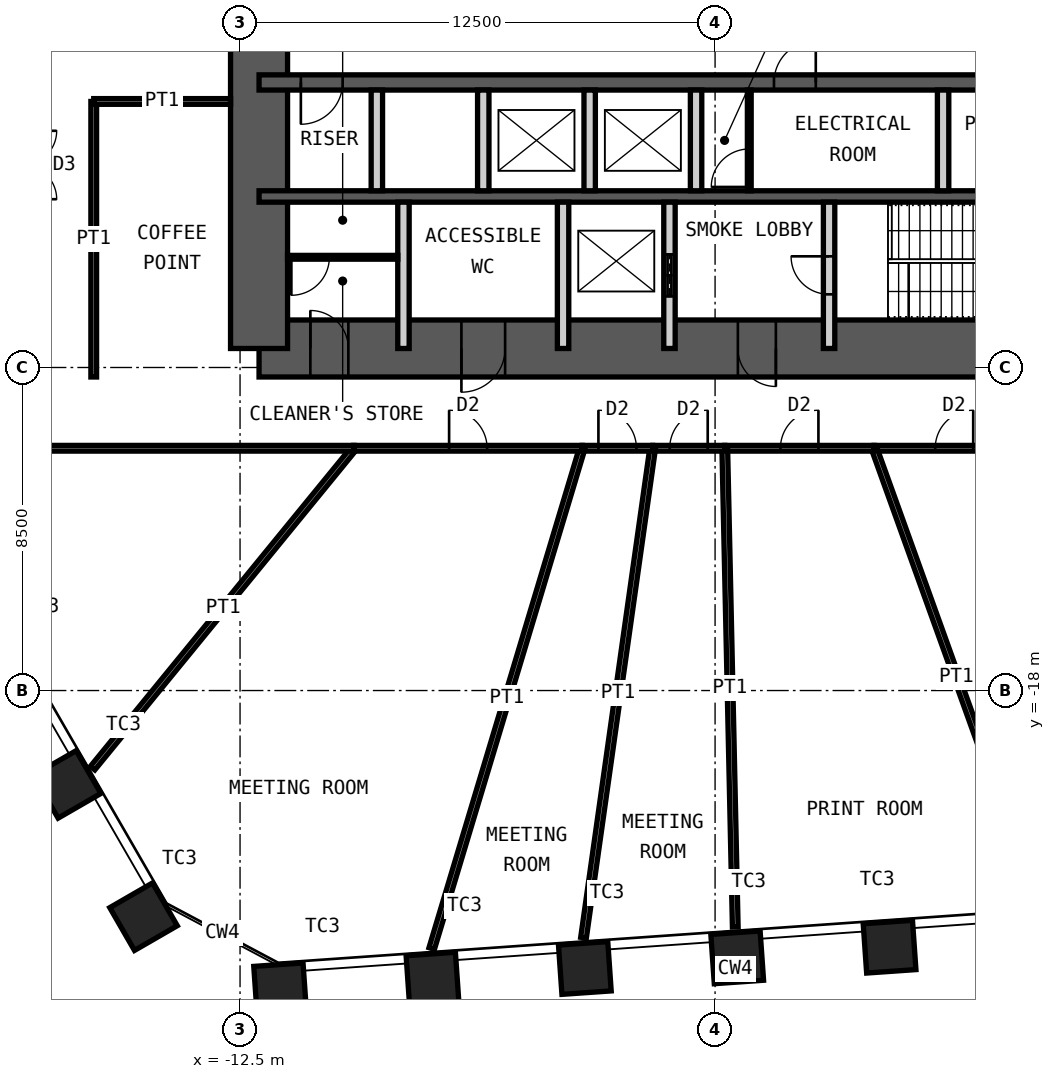
"""IFC4 building model, lengths in metres.
Left out: names, types, materials, properties, quantities, classifications, styles, units other than length and angle.
Written with IfcOpenShell. Run it as: python <this file> out.ifc"""

import sys

from ifc_helpers import new_model, si_unit, direction, frame, frame_2d, origin, origin_2d, place, context, subcontext, project, spatial, rectangle, hollow_rectangle, extrude, element, fill, save


model = new_model("IFC4")
c1 = context("Model", 3, precision=1e-05, world=origin(), true_north=direction((0.0, 1.0)))
c2 = subcontext(c1, "Body", "Model", "MODEL_VIEW")
j1 = project(units=[si_unit("LENGTHUNIT", "METRE"), si_unit("PLANEANGLEUNIT", "RADIAN")], contexts=[c1])
p1 = place(None, origin())
s1 = spatial("IfcSite", under=j1, at=p1, CompositionType="ELEMENT")
p2 = place(p1, origin())
s2 = spatial("IfcBuilding", under=s1, at=p2, CompositionType="ELEMENT")
p3 = place(p2, frame((0.0, 0.0, 107.2)))
s3 = spatial("IfcBuildingStorey", under=s2, at=p3, CompositionType="ELEMENT", Elevation=107.2)
for number, where, z_axis, x_axis in (
    (1, (4.592, -24.74, 0.0), (0.0, 0.0, 1.0), (0.998, 0.07, 0.0)),
    (2, (0.582, -25.02, 0.0), (0.0, 0.0, 1.0), (0.998, 0.07, 0.0)),
    (3, (-3.427, -25.301, 0.0), (0.0, 0.0, 1.0), (0.998, 0.07, 0.0)),
    (4, (-7.436, -25.581, 0.0), (0.0, 0.0, 1.0), (0.998, 0.07, 0.0)),
    (5, (-11.446, -25.861, 0.0), (0.0, 0.0, 1.0), (0.998, 0.07, 0.0)),
    (6, (-15.04, -23.95, 0.0), (0.0, 0.0, 1.0), (0.5, -0.866, 0.0)),
    (7, (-17.049, -20.47, 0.0), (0.0, 0.0, 1.0), (0.5, -0.866, 0.0)),
):
    element("IfcColumn", number, at=place(p3, frame(where, z_axis=z_axis, x_axis=x_axis)), inside=s3, PredefinedType="COLUMN", context=c2, shape_type="SweptSolid", body=[
        extrude(hollow_rectangle(XDim=1.3, YDim=1.3, WallThickness=0.1, at=origin_2d()), origin(), (0.0, 0.0, 1.0), 4.2),
    ])
p4 = place(p3, frame((-12.0, -9.0, 0.0), z_axis=(0.0, 0.0, 1.0), x_axis=(1.0, 0.0, 0.0)))
e8 = element("IfcWall", 8, at=p4, inside=s3, PredefinedType="SHEAR", context=c2, shape_type="SweptSolid", body=[
    extrude(rectangle(XDim=24.0, YDim=1.5, at=frame_2d((12.0, 0.0))), origin(), (0.0, 0.0, 1.0), 4.2),
])
p5 = place(p4, frame((1.35, 0.0, 0.0)))
e9 = element("IfcOpeningElement", 9, at=p5, cuts=e8, PredefinedType="OPENING", context=c2, shape_type="SweptSolid", body=[
    extrude(rectangle(XDim=1.0, YDim=2.1, at=frame_2d((0.5, 1.05))), frame((0.0, 0.76, 0.0), z_axis=(0.0, -1.0, 0.0), x_axis=(1.0, 0.0, 0.0)), (0.0, 0.0, 1.0), 1.52),
])
p6 = place(p4, frame((5.325, 0.0, 0.0)))
e10 = element("IfcOpeningElement", 10, at=p6, cuts=e8, PredefinedType="OPENING", context=c2, shape_type="SweptSolid", body=[
    extrude(rectangle(XDim=1.15, YDim=2.1, at=frame_2d((0.575, 1.05))), frame((0.0, 0.76, 0.0), z_axis=(0.0, -1.0, 0.0), x_axis=(1.0, 0.0, 0.0)), (0.0, 0.0, 1.0), 1.52),
])
p7 = place(p4, frame((12.6, 0.0, 0.0)))
e11 = element("IfcOpeningElement", 11, at=p7, cuts=e8, PredefinedType="OPENING", context=c2, shape_type="SweptSolid", body=[
    extrude(rectangle(XDim=1.0, YDim=2.1, at=frame_2d((0.5, 1.05))), frame((0.0, 0.76, 0.0), z_axis=(0.0, -1.0, 0.0), x_axis=(1.0, 0.0, 0.0)), (0.0, 0.0, 1.0), 1.52),
])
p8 = place(p3, frame((-12.0, -9.0, 0.0), z_axis=(0.0, 0.0, 1.0), x_axis=(0.0, 1.0, 0.0)))
e12 = element("IfcWall", 12, at=p8, inside=s3, PredefinedType="SHEAR", context=c2, shape_type="SweptSolid", body=[
    extrude(rectangle(XDim=18.0, YDim=1.5, at=frame_2d((9.0, 0.0))), origin(), (0.0, 0.0, 1.0), 4.2),
])
p9 = place(p8, frame((8.1, 0.0, 0.0)))
e13 = element("IfcOpeningElement", 13, at=p9, cuts=e12, PredefinedType="OPENING", context=c2, shape_type="SweptSolid", body=[
    extrude(rectangle(XDim=1.8, YDim=2.1, at=frame_2d((0.9, 1.05))), frame((0.0, 0.76, 0.0), z_axis=(0.0, -1.0, 0.0), x_axis=(1.0, 0.0, 0.0)), (0.0, 0.0, 1.0), 1.52),
])
p10 = place(p3, frame((-12.0, -2.0, 0.0), z_axis=(0.0, 0.0, 1.0), x_axis=(1.0, 0.0, 0.0)))
e14 = element("IfcWall", 14, at=p10, inside=s3, PredefinedType="SHEAR", context=c2, shape_type="SweptSolid", body=[
    extrude(rectangle(XDim=24.0, YDim=0.4, at=frame_2d((12.0, 0.0))), origin(), (0.0, 0.0, 1.0), 4.2),
])
p11 = place(p10, frame((1.1, 0.0, 0.0)))
e15 = element("IfcOpeningElement", 15, at=p11, cuts=e14, PredefinedType="OPENING", context=c2, shape_type="SweptSolid", body=[
    extrude(rectangle(XDim=1.1, YDim=2.1, at=frame_2d((0.55, 1.05))), frame((0.0, 0.21, 0.0), z_axis=(0.0, -1.0, 0.0), x_axis=(1.0, 0.0, 0.0)), (0.0, 0.0, 1.0), 0.42),
])
p12 = place(p10, frame((13.55, 0.0, 0.0)))
e16 = element("IfcOpeningElement", 16, at=p12, cuts=e14, PredefinedType="OPENING", context=c2, shape_type="SweptSolid", body=[
    extrude(rectangle(XDim=1.1, YDim=2.1, at=frame_2d((0.55, 1.05))), frame((0.0, 0.21, 0.0), z_axis=(0.0, -1.0, 0.0), x_axis=(1.0, 0.0, 0.0)), (0.0, 0.0, 1.0), 0.42),
])
p13 = place(p10, frame((20.7, 0.0, 0.0)))
e17 = element("IfcOpeningElement", 17, at=p13, cuts=e14, PredefinedType="OPENING", context=c2, shape_type="SweptSolid", body=[
    extrude(rectangle(XDim=1.1, YDim=2.1, at=frame_2d((0.55, 1.05))), frame((0.0, 0.21, 0.0), z_axis=(0.0, -1.0, 0.0), x_axis=(1.0, 0.0, 0.0)), (0.0, 0.0, 1.0), 0.42),
])
p14 = place(p3, frame((-12.0, -5.0, 0.0), z_axis=(0.0, 0.0, 1.0), x_axis=(1.0, 0.0, 0.0)))
e18 = element("IfcWall", 18, at=p14, inside=s3, PredefinedType="SHEAR", context=c2, shape_type="SweptSolid", body=[
    extrude(rectangle(XDim=24.0, YDim=0.3, at=frame_2d((12.0, 0.0))), origin(), (0.0, 0.0, 1.0), 4.2),
])
for number, where, z_axis, x_axis in (
    (19, (-8.9, -4.85, 0.0), (0.0, 0.0, 1.0), (0.0, 1.0, 0.0)),
    (20, (-6.1, -4.85, 0.0), (0.0, 0.0, 1.0), (0.0, 1.0, 0.0)),
    (21, (-3.3, -4.85, 0.0), (0.0, 0.0, 1.0), (0.0, 1.0, 0.0)),
    (22, (-0.5, -4.85, 0.0), (0.0, 0.0, 1.0), (0.0, 1.0, 0.0)),
    (23, (6.0, -4.85, 0.0), (0.0, 0.0, 1.0), (0.0, 1.0, 0.0)),
):
    element("IfcWall", number, at=place(p3, frame(where, z_axis=z_axis, x_axis=x_axis)), inside=s3, PredefinedType="PARTITIONING", context=c2, shape_type="SweptSolid", body=[
        extrude(rectangle(XDim=2.65, YDim=0.3, at=frame_2d((1.325, 0.0))), origin(), (0.0, 0.0, 1.0), 3.98),
    ])
for number, where, z_axis, x_axis in (
    (24, (-8.2, -9.0, 0.0), (0.0, 0.0, 1.0), (0.0, 1.0, 0.0)),
    (25, (-4.0, -9.0, 0.0), (0.0, 0.0, 1.0), (0.0, 1.0, 0.0)),
):
    element("IfcWall", number, at=place(p3, frame(where, z_axis=z_axis, x_axis=x_axis)), inside=s3, PredefinedType="PARTITIONING", context=c2, shape_type="SweptSolid", body=[
        extrude(rectangle(XDim=3.85, YDim=0.3, at=frame_2d((1.925, 0.0))), origin(), (0.0, 0.0, 1.0), 3.98),
    ])
p15 = place(p3, frame((-1.2, -9.0, 0.0), z_axis=(0.0, 0.0, 1.0), x_axis=(0.0, 1.0, 0.0)))
e26 = element("IfcWall", 26, at=p15, inside=s3, PredefinedType="PARTITIONING", context=c2, shape_type="SweptSolid", body=[
    extrude(rectangle(XDim=3.85, YDim=0.3, at=frame_2d((1.925, 0.0))), origin(), (0.0, 0.0, 1.0), 3.98),
])
p16 = place(p15, frame((1.375, 0.0, 0.0)))
e27 = element("IfcOpeningElement", 27, at=p16, cuts=e26, PredefinedType="OPENING", context=c2, shape_type="SweptSolid", body=[
    extrude(rectangle(XDim=1.1, YDim=2.4, at=frame_2d((0.55, 1.2))), frame((0.0, 0.16, 0.0), z_axis=(0.0, -1.0, 0.0), x_axis=(1.0, 0.0, 0.0)), (0.0, 0.0, 1.0), 0.32),
])
p17 = place(p3, frame((3.0, -9.0, 0.0), z_axis=(0.0, 0.0, 1.0), x_axis=(0.0, 1.0, 0.0)))
e28 = element("IfcWall", 28, at=p17, inside=s3, PredefinedType="PARTITIONING", context=c2, shape_type="SweptSolid", body=[
    extrude(rectangle(XDim=3.85, YDim=0.3, at=frame_2d((1.925, 0.0))), origin(), (0.0, 0.0, 1.0), 3.98),
])
p18 = place(p17, frame((1.425, 0.0, 0.0)))
e29 = element("IfcOpeningElement", 29, at=p18, cuts=e28, PredefinedType="OPENING", context=c2, shape_type="SweptSolid", body=[
    extrude(rectangle(XDim=1.0, YDim=2.1, at=frame_2d((0.5, 1.05))), frame((0.0, 0.16, 0.0), z_axis=(0.0, -1.0, 0.0), x_axis=(1.0, 0.0, 0.0)), (0.0, 0.0, 1.0), 0.32),
])
p19 = place(p3, frame((0.9, -4.85, 0.0), z_axis=(0.0, 0.0, 1.0), x_axis=(0.0, 1.0, 0.0)))
e30 = element("IfcWall", 30, at=p19, inside=s3, PredefinedType="PARTITIONING", context=c2, shape_type="SweptSolid", body=[
    extrude(rectangle(XDim=2.65, YDim=0.1, at=frame_2d((1.325, 0.0))), origin(), (0.0, 0.0, 1.0), 3.98),
])
p20 = place(p19, frame((0.1, 0.0, 0.0)))
e31 = element("IfcOpeningElement", 31, at=p20, cuts=e30, PredefinedType="OPENING", context=c2, shape_type="SweptSolid", body=[
    extrude(rectangle(XDim=1.0, YDim=2.4, at=frame_2d((0.5, 1.2))), frame((0.0, 0.06, 0.0), z_axis=(0.0, -1.0, 0.0), x_axis=(1.0, 0.0, 0.0)), (0.0, 0.0, 1.0), 0.12),
])
p21 = place(p3, frame((-11.25, -6.6, 0.0), z_axis=(0.0, 0.0, 1.0), x_axis=(1.0, 0.0, 0.0)))
e32 = element("IfcWall", 32, at=p21, inside=s3, PredefinedType="PARTITIONING", context=c2, shape_type="SweptSolid", body=[
    extrude(rectangle(XDim=2.9, YDim=0.1, at=frame_2d((1.45, 0.0))), origin(), (0.0, 0.0, 1.0), 3.98),
])
p22 = place(p21, frame((0.1, 0.0, 0.0)))
e33 = element("IfcOpeningElement", 33, at=p22, cuts=e32, PredefinedType="OPENING", context=c2, shape_type="SweptSolid", body=[
    extrude(rectangle(XDim=1.0, YDim=2.4, at=frame_2d((0.5, 1.2))), frame((0.0, 0.06, 0.0), z_axis=(0.0, -1.0, 0.0), x_axis=(1.0, 0.0, 0.0)), (0.0, 0.0, 1.0), 0.12),
])
p23 = place(p3, frame((-16.38, -20.042, 0.0), z_axis=(0.0, 0.0, 1.0), x_axis=(0.632814540967, 0.774303400962, 0.0)))
e34 = element("IfcWall", 34, at=p23, inside=s3, PredefinedType="PARTITIONING", context=c2, shape_type="SweptSolid", body=[
    extrude(rectangle(XDim=10.871, YDim=0.15, at=frame_2d((5.435, 0.0))), origin(), (0.0, 0.0, 1.0), 3.33),
])
p24 = place(p3, frame((-9.501, -11.625, 0.0), z_axis=(0.0, 0.0, 1.0), x_axis=(-1.0, 0.0, 0.0)))
e35 = element("IfcWall", 35, at=p24, inside=s3, PredefinedType="PARTITIONING", context=c2, shape_type="SweptSolid", body=[
    extrude(rectangle(XDim=8.724, YDim=0.15, at=frame_2d((4.362, 0.0))), origin(), (0.0, 0.0, 1.0), 4.03),
])
p25 = place(p3, frame((8.401, -11.625, 0.0), z_axis=(0.0, 0.0, 1.0), x_axis=(-1.0, 0.0, 0.0)))
e36 = element("IfcWall", 36, at=p25, inside=s3, PredefinedType="PARTITIONING", context=c2, shape_type="SweptSolid", body=[
    extrude(rectangle(XDim=4.217, YDim=0.15, at=frame_2d((2.109, 0.0))), origin(), (0.0, 0.0, 1.0), 4.03),
])
p26 = place(p25, frame((1.609, 0.0, 0.0)))
e37 = element("IfcOpeningElement", 37, at=p26, cuts=e36, PredefinedType="OPENING", context=c2, shape_type="SweptSolid", body=[
    extrude(rectangle(XDim=1.0, YDim=2.4, at=frame_2d((0.5, 1.2))), frame((0.0, 0.085, 0.0), z_axis=(0.0, -1.0, 0.0), x_axis=(1.0, 0.0, 0.0)), (0.0, 0.0, 1.0), 0.17),
])
p27 = place(p3, frame((8.518, -23.667, 0.0), z_axis=(0.0, 0.0, 1.0), x_axis=(-0.338635030469, 0.940917805198, 0.0)))
e38 = element("IfcWall", 38, at=p27, inside=s3, PredefinedType="PARTITIONING", context=c2, shape_type="SweptSolid", body=[
    extrude(rectangle(XDim=12.798, YDim=0.15, at=frame_2d((6.399, 0.0))), origin(), (0.0, 0.0, 1.0), 3.33),
])
p28 = place(p3, frame((4.184, -11.625, 0.0), z_axis=(0.0, 0.0, 1.0), x_axis=(-1.0, 0.0, 0.0)))
e39 = element("IfcWall", 39, at=p28, inside=s3, PredefinedType="PARTITIONING", context=c2, shape_type="SweptSolid", body=[
    extrude(rectangle(XDim=3.929, YDim=0.15, at=frame_2d((1.965, 0.0))), origin(), (0.0, 0.0, 1.0), 4.03),
])
p29 = place(p28, frame((1.465, 0.0, 0.0)))
e40 = element("IfcOpeningElement", 40, at=p29, cuts=e39, PredefinedType="OPENING", context=c2, shape_type="SweptSolid", body=[
    extrude(rectangle(XDim=1.0, YDim=2.4, at=frame_2d((0.5, 1.2))), frame((0.0, 0.085, 0.0), z_axis=(0.0, -1.0, 0.0), x_axis=(1.0, 0.0, 0.0)), (0.0, 0.0, 1.0), 0.17),
])
p30 = place(p3, frame((0.531, -24.222, 0.0), z_axis=(0.0, 0.0, 1.0), x_axis=(-0.021933557026, 0.999759430601, 0.0)))
e41 = element("IfcWall", 41, at=p30, inside=s3, PredefinedType="PARTITIONING", context=c2, shape_type="SweptSolid", body=[
    extrude(rectangle(XDim=12.6, YDim=0.15, at=frame_2d((6.3, 0.0))), origin(), (0.0, 0.0, 1.0), 3.33),
])
p31 = place(p3, frame((0.255, -11.625, 0.0), z_axis=(0.0, 0.0, 1.0), x_axis=(-1.0, 0.0, 0.0)))
e42 = element("IfcWall", 42, at=p31, inside=s3, PredefinedType="PARTITIONING", context=c2, shape_type="SweptSolid", body=[
    extrude(rectangle(XDim=1.897, YDim=0.15, at=frame_2d((0.949, 0.0))), origin(), (0.0, 0.0, 1.0), 4.03),
])
p32 = place(p31, frame((0.449, 0.0, 0.0)))
e43 = element("IfcOpeningElement", 43, at=p32, cuts=e42, PredefinedType="OPENING", context=c2, shape_type="SweptSolid", body=[
    extrude(rectangle(XDim=1.0, YDim=2.4, at=frame_2d((0.5, 1.2))), frame((0.0, 0.085, 0.0), z_axis=(0.0, -1.0, 0.0), x_axis=(1.0, 0.0, 0.0)), (0.0, 0.0, 1.0), 0.17),
])
p33 = place(p3, frame((-3.462, -24.503, 0.0), z_axis=(0.0, 0.0, 1.0), x_axis=(0.139899618934, 0.990165691499, 0.0)))
e44 = element("IfcWall", 44, at=p33, inside=s3, PredefinedType="PARTITIONING", context=c2, shape_type="SweptSolid", body=[
    extrude(rectangle(XDim=13.006, YDim=0.15, at=frame_2d((6.503, 0.0))), origin(), (0.0, 0.0, 1.0), 3.33),
])
p34 = place(p3, frame((-1.642, -11.625, 0.0), z_axis=(0.0, 0.0, 1.0), x_axis=(-1.0, 0.0, 0.0)))
e45 = element("IfcWall", 45, at=p34, inside=s3, PredefinedType="PARTITIONING", context=c2, shape_type="SweptSolid", body=[
    extrude(rectangle(XDim=1.855, YDim=0.15, at=frame_2d((0.927, 0.0))), origin(), (0.0, 0.0, 1.0), 4.03),
])
p35 = place(p34, frame((0.427, 0.0, 0.0)))
e46 = element("IfcOpeningElement", 46, at=p35, cuts=e45, PredefinedType="OPENING", context=c2, shape_type="SweptSolid", body=[
    extrude(rectangle(XDim=1.0, YDim=2.4, at=frame_2d((0.5, 1.2))), frame((0.0, 0.085, 0.0), z_axis=(0.0, -1.0, 0.0), x_axis=(1.0, 0.0, 0.0)), (0.0, 0.0, 1.0), 0.17),
])
p36 = place(p3, frame((-7.456, -24.787, 0.0), z_axis=(0.0, 0.0, 1.0), x_axis=(0.288055049501, 0.957613851433, 0.0)))
e47 = element("IfcWall", 47, at=p36, inside=s3, PredefinedType="PARTITIONING", context=c2, shape_type="SweptSolid", body=[
    extrude(rectangle(XDim=13.745, YDim=0.15, at=frame_2d((6.872, 0.0))), origin(), (0.0, 0.0, 1.0), 3.28),
])
p37 = place(p3, frame((-3.497, -11.625, 0.0), z_axis=(0.0, 0.0, 1.0), x_axis=(-1.0, 0.0, 0.0)))
e48 = element("IfcWall", 48, at=p37, inside=s3, PredefinedType="PARTITIONING", context=c2, shape_type="SweptSolid", body=[
    extrude(rectangle(XDim=6.004, YDim=0.15, at=frame_2d((3.002, 0.0))), origin(), (0.0, 0.0, 1.0), 4.03),
])
p38 = place(p37, frame((2.502, 0.0, 0.0)))
e49 = element("IfcOpeningElement", 49, at=p38, cuts=e48, PredefinedType="OPENING", context=c2, shape_type="SweptSolid", body=[
    extrude(rectangle(XDim=1.0, YDim=2.4, at=frame_2d((0.5, 1.2))), frame((0.0, 0.085, 0.0), z_axis=(0.0, -1.0, 0.0), x_axis=(1.0, 0.0, 0.0)), (0.0, 0.0, 1.0), 0.17),
])
p39 = place(p3, frame((-16.35, -9.75, 0.0), z_axis=(0.0, 0.0, 1.0), x_axis=(0.0, 1.0, 0.0)))
e50 = element("IfcWall", 50, at=p39, inside=s3, PredefinedType="PARTITIONING", context=c2, shape_type="SweptSolid", body=[
    extrude(rectangle(XDim=7.25, YDim=0.15, at=frame_2d((3.625, 0.0))), origin(), (0.0, 0.0, 1.0), 4.03),
])
p40 = place(p3, frame((-12.75, -2.5, 0.0), z_axis=(0.0, 0.0, 1.0), x_axis=(-1.0, 0.0, 0.0)))
e51 = element("IfcWall", 51, at=p40, inside=s3, PredefinedType="PARTITIONING", context=c2, shape_type="SweptSolid", body=[
    extrude(rectangle(XDim=3.6, YDim=0.15, at=frame_2d((1.8, 0.0))), origin(), (0.0, 0.0, 1.0), 3.33),
])
p41 = place(p5, origin())
e52 = element("IfcDoor", 52, at=p41, inside=s3, OperationType="SINGLE_SWING_RIGHT", PredefinedType="DOOR", context=c2, shape_type="SweptSolid", body=[
    extrude(rectangle(XDim=1.0, YDim=2.1, at=frame_2d((0.5, 1.05))), frame((0.0, 0.025, 0.0), z_axis=(0.0, -1.0, 0.0), x_axis=(1.0, 0.0, 0.0)), (0.0, 0.0, 1.0), 0.05),
])
fill(e9, e52)
p42 = place(p6, origin())
e53 = element("IfcDoor", 53, at=p42, inside=s3, OperationType="SINGLE_SWING_LEFT", PredefinedType="DOOR", context=c2, shape_type="SweptSolid", body=[
    extrude(rectangle(XDim=1.15, YDim=2.1, at=frame_2d((0.575, 1.05))), frame((0.0, 0.025, 0.0), z_axis=(0.0, -1.0, 0.0), x_axis=(1.0, 0.0, 0.0)), (0.0, 0.0, 1.0), 0.05),
])
fill(e10, e53)
p43 = place(p7, origin())
e54 = element("IfcDoor", 54, at=p43, inside=s3, OperationType="SINGLE_SWING_RIGHT", PredefinedType="DOOR", context=c2, shape_type="SweptSolid", body=[
    extrude(rectangle(XDim=1.0, YDim=2.1, at=frame_2d((0.5, 1.05))), frame((0.0, 0.025, 0.0), z_axis=(0.0, -1.0, 0.0), x_axis=(1.0, 0.0, 0.0)), (0.0, 0.0, 1.0), 0.05),
])
fill(e11, e54)
p44 = place(p18, origin())
e55 = element("IfcDoor", 55, at=p44, inside=s3, OperationType="SINGLE_SWING_LEFT", PredefinedType="DOOR", context=c2, shape_type="SweptSolid", body=[
    extrude(rectangle(XDim=1.0, YDim=2.1, at=frame_2d((0.5, 1.05))), frame((0.0, 0.025, 0.0), z_axis=(0.0, -1.0, 0.0), x_axis=(1.0, 0.0, 0.0)), (0.0, 0.0, 1.0), 0.05),
])
fill(e29, e55)
p45 = place(p11, origin())
e56 = element("IfcDoor", 56, at=p45, inside=s3, OperationType="SINGLE_SWING_LEFT", PredefinedType="DOOR", context=c2, shape_type="SweptSolid", body=[
    extrude(rectangle(XDim=1.1, YDim=2.1, at=frame_2d((0.55, 1.05))), frame((0.0, 0.025, 0.0), z_axis=(0.0, -1.0, 0.0), x_axis=(1.0, 0.0, 0.0)), (0.0, 0.0, 1.0), 0.05),
])
fill(e15, e56)
p46 = place(p12, origin())
e57 = element("IfcDoor", 57, at=p46, inside=s3, OperationType="SINGLE_SWING_LEFT", PredefinedType="DOOR", context=c2, shape_type="SweptSolid", body=[
    extrude(rectangle(XDim=1.1, YDim=2.1, at=frame_2d((0.55, 1.05))), frame((0.0, 0.025, 0.0), z_axis=(0.0, -1.0, 0.0), x_axis=(1.0, 0.0, 0.0)), (0.0, 0.0, 1.0), 0.05),
])
fill(e16, e57)
p47 = place(p16, origin())
e58 = element("IfcDoor", 58, at=p47, inside=s3, OperationType="DOUBLE_DOOR_SLIDING", PredefinedType="DOOR", context=c2, shape_type="SweptSolid", body=[
    extrude(rectangle(XDim=1.1, YDim=2.4, at=frame_2d((0.55, 1.2))), frame((0.0, 0.025, 0.0), z_axis=(0.0, -1.0, 0.0), x_axis=(1.0, 0.0, 0.0)), (0.0, 0.0, 1.0), 0.05),
])
fill(e27, e58)
p48 = place(p20, origin())
e59 = element("IfcDoor", 59, at=p48, inside=s3, OperationType="SINGLE_SWING_RIGHT", PredefinedType="DOOR", context=c2, shape_type="SweptSolid", body=[
    extrude(rectangle(XDim=1.0, YDim=2.4, at=frame_2d((0.5, 1.2))), frame((0.0, 0.025, 0.0), z_axis=(0.0, -1.0, 0.0), x_axis=(1.0, 0.0, 0.0)), (0.0, 0.0, 1.0), 0.05),
])
fill(e31, e59)
p49 = place(p22, origin())
e60 = element("IfcDoor", 60, at=p49, inside=s3, OperationType="SINGLE_SWING_LEFT", PredefinedType="DOOR", context=c2, shape_type="SweptSolid", body=[
    extrude(rectangle(XDim=1.0, YDim=2.4, at=frame_2d((0.5, 1.2))), frame((0.0, 0.025, 0.0), z_axis=(0.0, -1.0, 0.0), x_axis=(1.0, 0.0, 0.0)), (0.0, 0.0, 1.0), 0.05),
])
fill(e33, e60)
p50 = place(p26, origin())
e61 = element("IfcDoor", 61, at=p50, inside=s3, OperationType="SINGLE_SWING_LEFT", PredefinedType="DOOR", context=c2, shape_type="SweptSolid", body=[
    extrude(rectangle(XDim=1.0, YDim=2.4, at=frame_2d((0.5, 1.2))), frame((0.0, 0.025, 0.0), z_axis=(0.0, -1.0, 0.0), x_axis=(1.0, 0.0, 0.0)), (0.0, 0.0, 1.0), 0.05),
])
fill(e37, e61)
p51 = place(p29, origin())
e62 = element("IfcDoor", 62, at=p51, inside=s3, OperationType="SINGLE_SWING_LEFT", PredefinedType="DOOR", context=c2, shape_type="SweptSolid", body=[
    extrude(rectangle(XDim=1.0, YDim=2.4, at=frame_2d((0.5, 1.2))), frame((0.0, 0.025, 0.0), z_axis=(0.0, -1.0, 0.0), x_axis=(1.0, 0.0, 0.0)), (0.0, 0.0, 1.0), 0.05),
])
fill(e40, e62)
p52 = place(p32, origin())
e63 = element("IfcDoor", 63, at=p52, inside=s3, OperationType="SINGLE_SWING_LEFT", PredefinedType="DOOR", context=c2, shape_type="SweptSolid", body=[
    extrude(rectangle(XDim=1.0, YDim=2.4, at=frame_2d((0.5, 1.2))), frame((0.0, 0.025, 0.0), z_axis=(0.0, -1.0, 0.0), x_axis=(1.0, 0.0, 0.0)), (0.0, 0.0, 1.0), 0.05),
])
fill(e43, e63)
p53 = place(p35, origin())
e64 = element("IfcDoor", 64, at=p53, inside=s3, OperationType="SINGLE_SWING_RIGHT", PredefinedType="DOOR", context=c2, shape_type="SweptSolid", body=[
    extrude(rectangle(XDim=1.0, YDim=2.4, at=frame_2d((0.5, 1.2))), frame((0.0, 0.025, 0.0), z_axis=(0.0, -1.0, 0.0), x_axis=(1.0, 0.0, 0.0)), (0.0, 0.0, 1.0), 0.05),
])
fill(e46, e64)
p54 = place(p38, origin())
e65 = element("IfcDoor", 65, at=p54, inside=s3, OperationType="SINGLE_SWING_RIGHT", PredefinedType="DOOR", context=c2, shape_type="SweptSolid", body=[
    extrude(rectangle(XDim=1.0, YDim=2.4, at=frame_2d((0.5, 1.2))), frame((0.0, 0.025, 0.0), z_axis=(0.0, -1.0, 0.0), x_axis=(1.0, 0.0, 0.0)), (0.0, 0.0, 1.0), 0.05),
])
fill(e49, e65)
save(model, sys.argv[1])
